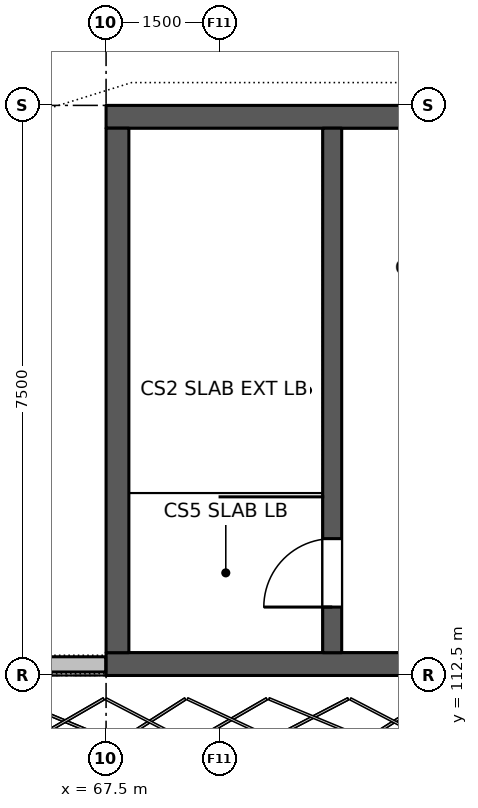
"""IFC4 building model, lengths in metres.
Left out: names, types, materials, properties, quantities, classifications, styles, units other than length and angle.
Written with IfcOpenShell. Run it as: python <this file> out.ifc"""

import sys

from ifc_helpers import new_model, si_unit, direction, frame, frame_2d, origin, place, context, subcontext, project, spatial, polyline, rectangle, outline, extrude, element, fill, save


model = new_model("IFC4")
c1 = context("Model", 3, precision=1e-05, world=origin(), true_north=direction((0.0, 1.0)))
c2 = subcontext(c1, "Body", "Model", "MODEL_VIEW")
j1 = project(units=[si_unit("LENGTHUNIT", "METRE"), si_unit("PLANEANGLEUNIT", "RADIAN")], contexts=[c1])
p1 = place(None, origin())
s1 = spatial("IfcSite", under=j1, at=p1, CompositionType="ELEMENT")
p2 = place(p1, origin())
s2 = spatial("IfcBuilding", under=s1, at=p2, CompositionType="ELEMENT")
p3 = place(p2, frame((0.0, 0.0, 13.2)))
s3 = spatial("IfcBuildingStorey", under=s2, at=p3, CompositionType="ELEMENT", Elevation=13.2)
p4 = place(p3, frame((60.002, 112.646, 0.0), z_axis=(0.0, 0.0, 1.0), x_axis=(1.0, 0.0, 0.0)))
e1 = element("IfcWall", 1, at=p4, inside=s3, PredefinedType="SOLIDWALL", context=c2, shape_type="SweptSolid", body=[
    extrude(rectangle(XDim=7.493, YDim=0.2, at=frame_2d((3.747, 0.0))), origin(), (0.0, 0.0, 1.0), 1.2),
])
p5 = place(p3, frame((67.5, 119.85, 0.0), z_axis=(0.0, 0.0, 1.0), x_axis=(1.0, 0.0, 0.0)))
e2 = element("IfcWall", 2, at=p5, inside=s3, PredefinedType="SHEAR", context=c2, shape_type="SweptSolid", body=[
    extrude(rectangle(XDim=15.0, YDim=0.3, at=frame_2d((7.5, 0.0))), origin(), (0.0, 0.0, 1.0), 3.3),
])
p6 = place(p5, frame((6.6, 0.0, 0.0)))
e3 = element("IfcOpeningElement", 3, at=p6, cuts=e2, PredefinedType="OPENING", context=c2, shape_type="SweptSolid", body=[
    extrude(rectangle(XDim=1.8, YDim=2.1, at=frame_2d((0.9, 1.05))), frame((0.0, 0.16, 0.0), z_axis=(0.0, -1.0, 0.0), x_axis=(1.0, 0.0, 0.0)), (0.0, 0.0, 1.0), 0.32),
])
p7 = place(p3, frame((72.5, 112.65, 0.0), z_axis=(0.0, 0.0, 1.0), x_axis=(-1.0, 0.0, 0.0)))
e4 = element("IfcWall", 4, at=p7, inside=s3, PredefinedType="SHEAR", context=c2, shape_type="SweptSolid", body=[
    extrude(rectangle(XDim=5.0, YDim=0.3, at=frame_2d((2.5, 0.0))), origin(), (0.0, 0.0, 1.0), 3.875),
])
p8 = place(p3, frame((67.65, 119.7, 0.0), z_axis=(0.0, 0.0, 1.0), x_axis=(0.0, -1.0, 0.0)))
e5 = element("IfcWall", 5, at=p8, inside=s3, PredefinedType="SHEAR", context=c2, shape_type="SweptSolid", body=[
    extrude(outline(polyline([(0.0, 0.0), (6.9, 0.0), (6.9, 3.875), (0.0, 3.3), (0.0, 0.0)])), frame((0.0, 0.15, 0.0), z_axis=(0.0, -1.0, 0.0), x_axis=(1.0, 0.0, 0.0)), (0.0, 0.0, 1.0), 0.3),
])
p9 = place(p3, frame((70.475, 112.8, 0.0), z_axis=(0.0, 0.0, 1.0), x_axis=(0.0, 1.0, 0.0)))
e6 = element("IfcWall", 6, at=p9, inside=s3, PredefinedType="STANDARD", context=c2, shape_type="SweptSolid", body=[
    extrude(outline(polyline([(0.0, 0.0), (6.9, 0.0), (6.9, 3.1), (0.0, 3.675), (0.0, 0.0)])), frame((0.0, 0.125, 0.0), z_axis=(0.0, -1.0, 0.0), x_axis=(1.0, 0.0, 0.0)), (0.0, 0.0, 1.0), 0.25),
])
p10 = place(p9, frame((0.6, 0.0, 0.0)))
e7 = element("IfcOpeningElement", 7, at=p10, cuts=e6, PredefinedType="OPENING", context=c2, shape_type="SweptSolid", body=[
    extrude(rectangle(XDim=0.9, YDim=2.1, at=frame_2d((0.45, 1.05))), frame((0.0, 0.135, 0.0), z_axis=(0.0, -1.0, 0.0), x_axis=(1.0, 0.0, 0.0)), (0.0, 0.0, 1.0), 0.27),
])
p11 = place(p10, origin())
e8 = element("IfcDoor", 8, at=p11, inside=s3, OperationType="SINGLE_SWING_RIGHT", PredefinedType="DOOR", context=c2, shape_type="SweptSolid", body=[
    extrude(rectangle(XDim=0.9, YDim=2.1, at=frame_2d((0.45, 1.05))), frame((0.0, 0.025, 0.0), z_axis=(0.0, -1.0, 0.0), x_axis=(1.0, 0.0, 0.0)), (0.0, 0.0, 1.0), 0.05),
])
fill(e7, e8)
save(model, sys.argv[1])
